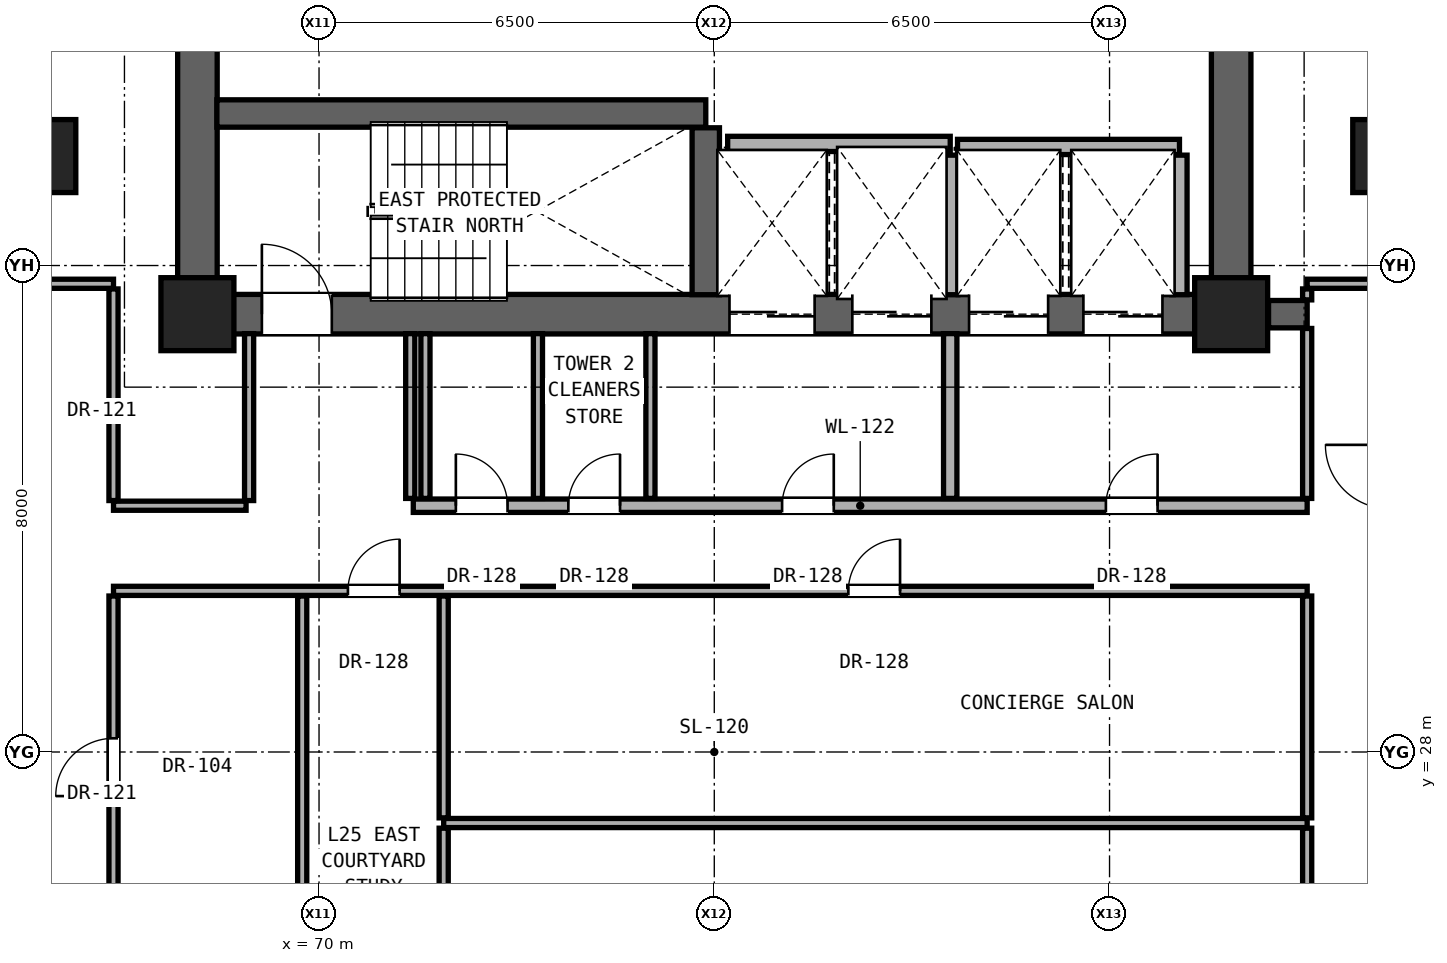
"""IFC4 building model, lengths in metres.
Left out: names, types, materials, properties, quantities, classifications, styles, units other than length and angle.
Written with IfcOpenShell. Run it as: python <this file> out.ifc"""

import sys

from ifc_helpers import new_model, si_unit, direction, frame, frame_2d, origin, origin_2d, place, context, subcontext, project, spatial, rectangle, extrude, element, fill, save


model = new_model("IFC4")
c1 = context("Model", 3, precision=1e-05, world=origin(), true_north=direction((0.0, 1.0)))
c2 = subcontext(c1, "Body", "Model", "MODEL_VIEW")
j1 = project(units=[si_unit("LENGTHUNIT", "METRE"), si_unit("PLANEANGLEUNIT", "RADIAN")], contexts=[c1])
p1 = place(None, origin())
s1 = spatial("IfcSite", under=j1, at=p1, CompositionType="ELEMENT")
p2 = place(p1, origin())
s2 = spatial("IfcBuilding", under=s1, at=p2, CompositionType="ELEMENT")
p3 = place(p2, frame((0.0, 0.0, 91.7)))
s3 = spatial("IfcBuildingStorey", under=s2, at=p3, CompositionType="ELEMENT", Elevation=91.7)
for number, where, z_axis, x_axis in (
    (1, (68.0, 35.2, 0.0), (0.0, 0.0, 1.0), (1.0, 0.0, 0.0)),
    (2, (85.0, 35.2, 0.0), (0.0, 0.0, 1.0), (1.0, 0.0, 0.0)),
):
    element("IfcColumn", number, at=place(p3, frame(where, z_axis=z_axis, x_axis=x_axis)), inside=s3, PredefinedType="COLUMN", context=c2, shape_type="SweptSolid", body=[
        extrude(rectangle(XDim=1.2, YDim=1.2, at=origin_2d()), origin(), (0.0, 0.0, 1.0), 3.3),
    ])
for number, where, z_axis, x_axis in (
    (3, (65.6, 37.8, 0.0), (0.0, 0.0, 1.0), (1.0, 0.0, 0.0)),
    (4, (87.4, 37.8, 0.0), (0.0, 0.0, 1.0), (1.0, 0.0, 0.0)),
):
    element("IfcColumn", number, at=place(p3, frame(where, z_axis=z_axis, x_axis=x_axis)), inside=s3, PredefinedType="PILASTER", context=c2, shape_type="SweptSolid", body=[
        extrude(rectangle(XDim=0.8, YDim=1.2, at=origin_2d()), origin(), (0.0, 0.0, 1.0), 3.3),
    ])
for number, where, z_axis, x_axis in (
    (5, (68.0, 35.2, 0.0), (0.0, 0.0, 1.0), (0.0, 1.0, 0.0)),
    (6, (85.0, 35.2, 0.0), (0.0, 0.0, 1.0), (0.0, 1.0, 0.0)),
):
    element("IfcWall", number, at=place(p3, frame(where, z_axis=z_axis, x_axis=x_axis)), inside=s3, PredefinedType="SHEAR", context=c2, shape_type="SweptSolid", body=[
        extrude(rectangle(XDim=5.6, YDim=0.65, at=frame_2d((2.8, 0.0))), origin(), (0.0, 0.0, 1.0), 3.08),
    ])
p4 = place(p3, frame((68.0, 35.2, 0.0), z_axis=(0.0, 0.0, 1.0), x_axis=(1.0, 0.0, 0.0)))
e7 = element("IfcWall", 7, at=p4, inside=s3, PredefinedType="SHEAR", context=c2, shape_type="SweptSolid", body=[
    extrude(rectangle(XDim=17.0, YDim=0.65, at=frame_2d((8.5, 0.0))), origin(), (0.0, 0.0, 1.0), 3.08),
])
p5 = place(p4, frame((1.06, 0.0, 0.0)))
e8 = element("IfcOpeningElement", 8, at=p5, cuts=e7, PredefinedType="OPENING", context=c2, shape_type="SweptSolid", body=[
    extrude(rectangle(XDim=1.15, YDim=2.2, at=frame_2d((0.575, 1.1))), frame((0.0, 0.335, 0.0), z_axis=(0.0, -1.0, 0.0), x_axis=(1.0, 0.0, 0.0)), (0.0, 0.0, 1.0), 0.67),
])
p6 = place(p4, frame((8.75, 0.0, 0.0)))
e9 = element("IfcOpeningElement", 9, at=p6, cuts=e7, PredefinedType="OPENING", context=c2, shape_type="SweptSolid", body=[
    extrude(rectangle(XDim=1.4, YDim=2.35, at=frame_2d((0.7, 1.175))), frame((0.0, 0.335, 0.0), z_axis=(0.0, -1.0, 0.0), x_axis=(1.0, 0.0, 0.0)), (0.0, 0.0, 1.0), 0.67),
])
p7 = place(p4, frame((10.77, 0.0, 0.0)))
e10 = element("IfcOpeningElement", 10, at=p7, cuts=e7, PredefinedType="OPENING", context=c2, shape_type="SweptSolid", body=[
    extrude(rectangle(XDim=1.3, YDim=2.3, at=frame_2d((0.65, 1.15))), frame((0.0, 0.335, 0.0), z_axis=(0.0, -1.0, 0.0), x_axis=(1.0, 0.0, 0.0)), (0.0, 0.0, 1.0), 0.67),
])
p8 = place(p4, frame((12.69, 0.0, 0.0)))
e11 = element("IfcOpeningElement", 11, at=p8, cuts=e7, PredefinedType="OPENING", context=c2, shape_type="SweptSolid", body=[
    extrude(rectangle(XDim=1.3, YDim=2.3, at=frame_2d((0.65, 1.15))), frame((0.0, 0.335, 0.0), z_axis=(0.0, -1.0, 0.0), x_axis=(1.0, 0.0, 0.0)), (0.0, 0.0, 1.0), 0.67),
])
p9 = place(p4, frame((14.57, 0.0, 0.0)))
e12 = element("IfcOpeningElement", 12, at=p9, cuts=e7, PredefinedType="OPENING", context=c2, shape_type="SweptSolid", body=[
    extrude(rectangle(XDim=1.3, YDim=2.3, at=frame_2d((0.65, 1.15))), frame((0.0, 0.335, 0.0), z_axis=(0.0, -1.0, 0.0), x_axis=(1.0, 0.0, 0.0)), (0.0, 0.0, 1.0), 0.67),
])
p10 = place(p3, frame((72.05, 26.832, 0.0), z_axis=(0.0, 0.0, 1.0), x_axis=(1.0, 0.0, 0.0)))
e13 = element("IfcWall", 13, at=p10, inside=s3, PredefinedType="PARTITIONING", context=c2, shape_type="SweptSolid", body=[
    extrude(rectangle(XDim=14.2, YDim=0.15, at=frame_2d((7.1, 0.0))), origin(), (0.0, 0.0, 1.0), 2.145),
])
p11 = place(p3, frame((66.62, 30.65, 0.0), z_axis=(0.0, 0.0, 1.0), x_axis=(1.0, 0.0, 0.0)))
e14 = element("IfcWall", 14, at=p11, inside=s3, PredefinedType="PARTITIONING", context=c2, shape_type="SweptSolid", body=[
    extrude(rectangle(XDim=19.63, YDim=0.15, at=frame_2d((9.815, 0.0))), origin(), (0.0, 0.0, 1.0), 2.145),
])
p12 = place(p11, frame((3.855, 0.0, 0.0)))
e15 = element("IfcOpeningElement", 15, at=p12, cuts=e14, PredefinedType="OPENING", context=c2, shape_type="SweptSolid", body=[
    extrude(rectangle(XDim=0.85, YDim=2.01, at=frame_2d((0.425, 1.005))), frame((0.0, 0.085, 0.0), z_axis=(0.0, -1.0, 0.0), x_axis=(1.0, 0.0, 0.0)), (0.0, 0.0, 1.0), 0.17),
])
p13 = place(p11, frame((12.085, 0.0, 0.0)))
e16 = element("IfcOpeningElement", 16, at=p13, cuts=e14, PredefinedType="OPENING", context=c2, shape_type="SweptSolid", body=[
    extrude(rectangle(XDim=0.85, YDim=2.01, at=frame_2d((0.425, 1.005))), frame((0.0, 0.085, 0.0), z_axis=(0.0, -1.0, 0.0), x_axis=(1.0, 0.0, 0.0)), (0.0, 0.0, 1.0), 0.17),
])
p14 = place(p3, frame((66.62, 32.05, 0.0), z_axis=(0.0, 0.0, 1.0), x_axis=(1.0, 0.0, 0.0)))
e17 = element("IfcWall", 17, at=p14, inside=s3, PredefinedType="PARTITIONING", context=c2, shape_type="SweptSolid", body=[
    extrude(rectangle(XDim=2.18, YDim=0.15, at=frame_2d((1.09, 0.0))), origin(), (0.0, 0.0, 1.0), 2.145),
])
p15 = place(p3, frame((71.55, 32.05, 0.0), z_axis=(0.0, 0.0, 1.0), x_axis=(1.0, 0.0, 0.0)))
e18 = element("IfcWall", 18, at=p15, inside=s3, PredefinedType="SOLIDWALL", context=c2, shape_type="SweptSolid", body=[
    extrude(rectangle(XDim=14.7, YDim=0.22, at=frame_2d((7.35, 0.0))), origin(), (0.0, 0.0, 1.0), 2.145),
])
p16 = place(p15, frame((11.39, 0.0, 0.0)))
e19 = element("IfcOpeningElement", 19, at=p16, cuts=e18, PredefinedType="OPENING", context=c2, shape_type="SweptSolid", body=[
    extrude(rectangle(XDim=0.85, YDim=2.01, at=frame_2d((0.425, 1.005))), frame((0.0, 0.12, 0.0), z_axis=(0.0, -1.0, 0.0), x_axis=(1.0, 0.0, 0.0)), (0.0, 0.0, 1.0), 0.24),
])
p17 = place(p15, frame((6.065, 0.0, 0.0)))
e20 = element("IfcOpeningElement", 20, at=p17, cuts=e18, PredefinedType="OPENING", context=c2, shape_type="SweptSolid", body=[
    extrude(rectangle(XDim=0.85, YDim=2.01, at=frame_2d((0.425, 1.005))), frame((0.0, 0.12, 0.0), z_axis=(0.0, -1.0, 0.0), x_axis=(1.0, 0.0, 0.0)), (0.0, 0.0, 1.0), 0.24),
])
p18 = place(p15, frame((0.7, 0.0, 0.0)))
e21 = element("IfcOpeningElement", 21, at=p18, cuts=e18, PredefinedType="OPENING", context=c2, shape_type="SweptSolid", body=[
    extrude(rectangle(XDim=0.85, YDim=2.01, at=frame_2d((0.425, 1.005))), frame((0.0, 0.12, 0.0), z_axis=(0.0, -1.0, 0.0), x_axis=(1.0, 0.0, 0.0)), (0.0, 0.0, 1.0), 0.24),
])
p19 = place(p15, frame((2.55, 0.0, 0.0)))
e22 = element("IfcOpeningElement", 22, at=p19, cuts=e18, PredefinedType="OPENING", context=c2, shape_type="SweptSolid", body=[
    extrude(rectangle(XDim=0.85, YDim=2.01, at=frame_2d((0.425, 1.005))), frame((0.0, 0.12, 0.0), z_axis=(0.0, -1.0, 0.0), x_axis=(1.0, 0.0, 0.0)), (0.0, 0.0, 1.0), 0.24),
])
p20 = place(p3, frame((85.615, 35.2, 0.0), z_axis=(0.0, 0.0, 1.0), x_axis=(1.0, 0.0, 0.0)))
e23 = element("IfcWall", 23, at=p20, inside=s3, PredefinedType="SHEAR", context=c2, shape_type="SweptSolid", body=[
    extrude(rectangle(XDim=0.635, YDim=0.45, at=frame_2d((0.317, 0.0))), origin(), (0.0, 0.0, 1.0), 3.08),
])
p21 = place(p3, frame((65.25, 35.7, 0.0), z_axis=(0.0, 0.0, 1.0), x_axis=(1.0, 0.0, 0.0)))
e24 = element("IfcWall", 24, at=p21, inside=s3, PredefinedType="PARTITIONING", context=c2, shape_type="SweptSolid", body=[
    extrude(rectangle(XDim=1.37, YDim=0.15, at=frame_2d((0.685, 0.0))), origin(), (0.0, 0.0, 1.0), 3.08),
])
p22 = place(p3, frame((86.25, 35.7, 0.0), z_axis=(0.0, 0.0, 1.0), x_axis=(1.0, 0.0, 0.0)))
e25 = element("IfcWall", 25, at=p22, inside=s3, PredefinedType="PARTITIONING", context=c2, shape_type="SweptSolid", body=[
    extrude(rectangle(XDim=1.35, YDim=0.15, at=frame_2d((0.675, 0.0))), origin(), (0.0, 0.0, 1.0), 3.08),
])
p23 = place(p3, frame((80.5, 37.95, 0.0), z_axis=(0.0, 0.0, 1.0), x_axis=(1.0, 0.0, 0.0)))
e26 = element("IfcWall", 26, at=p23, inside=s3, PredefinedType="SOLIDWALL", context=c2, shape_type="SweptSolid", body=[
    extrude(rectangle(XDim=3.65, YDim=0.25, at=frame_2d((1.825, 0.0))), origin(), (0.0, 0.0, 1.0), 3.08),
])
p24 = place(p3, frame((76.72, 38.0, 0.0), z_axis=(0.0, 0.0, 1.0), x_axis=(1.0, 0.0, 0.0)))
e27 = element("IfcWall", 27, at=p24, inside=s3, PredefinedType="SOLIDWALL", context=c2, shape_type="SweptSolid", body=[
    extrude(rectangle(XDim=3.66, YDim=0.25, at=frame_2d((1.83, 0.0))), origin(), (0.0, 0.0, 1.0), 3.08),
])
p25 = place(p3, frame((68.32, 38.5, 0.0), z_axis=(0.0, 0.0, 1.0), x_axis=(1.0, 0.0, 0.0)))
e28 = element("IfcWall", 28, at=p25, inside=s3, PredefinedType="SHEAR", context=c2, shape_type="SweptSolid", body=[
    extrude(rectangle(XDim=8.04, YDim=0.45, at=frame_2d((4.02, 0.0))), origin(), (0.0, 0.0, 1.0), 3.08),
])
p26 = place(p3, frame((66.62, 24.935, 0.0), z_axis=(0.0, 0.0, 1.0), x_axis=(0.0, 1.0, 0.0)))
e29 = element("IfcWall", 29, at=p26, inside=s3, PredefinedType="PARTITIONING", context=c2, shape_type="SweptSolid", body=[
    extrude(rectangle(XDim=5.63, YDim=0.15, at=frame_2d((2.815, 0.0))), origin(), (0.0, 0.0, 1.0), 2.299),
])
p27 = place(p26, frame((2.34, 0.0, 0.0)))
e30 = element("IfcOpeningElement", 30, at=p27, cuts=e29, PredefinedType="OPENING", context=c2, shape_type="SweptSolid", body=[
    extrude(rectangle(XDim=0.95, YDim=2.15, at=frame_2d((0.475, 1.075))), frame((0.0, 0.085, 0.0), z_axis=(0.0, -1.0, 0.0), x_axis=(1.0, 0.0, 0.0)), (0.0, 0.0, 1.0), 0.17),
])
p28 = place(p3, frame((66.62, 32.135, 0.0), z_axis=(0.0, 0.0, 1.0), x_axis=(0.0, 1.0, 0.0)))
e31 = element("IfcWall", 31, at=p28, inside=s3, PredefinedType="PARTITIONING", context=c2, shape_type="SweptSolid", body=[
    extrude(rectangle(XDim=3.48, YDim=0.15, at=frame_2d((1.74, 0.0))), origin(), (0.0, 0.0, 1.0), 2.472),
])
p29 = place(p3, frame((68.85, 32.135, 0.0), z_axis=(0.0, 0.0, 1.0), x_axis=(0.0, 1.0, 0.0)))
e32 = element("IfcWall", 32, at=p29, inside=s3, PredefinedType="PARTITIONING", context=c2, shape_type="SweptSolid", body=[
    extrude(rectangle(XDim=2.745, YDim=0.15, at=frame_2d((1.373, 0.0))), origin(), (0.0, 0.0, 1.0), 3.08),
])
p30 = place(p3, frame((69.723, 24.935, 0.0), z_axis=(0.0, 0.0, 1.0), x_axis=(0.0, 1.0, 0.0)))
e33 = element("IfcWall", 33, at=p30, inside=s3, PredefinedType="PARTITIONING", context=c2, shape_type="SweptSolid", body=[
    extrude(rectangle(XDim=5.63, YDim=0.15, at=frame_2d((2.815, 0.0))), origin(), (0.0, 0.0, 1.0), 2.145),
])
for number, where, z_axis, x_axis in (
    (34, (71.5, 32.17, 0.0), (0.0, 0.0, 1.0), (0.0, 1.0, 0.0)),
    (35, (71.75, 32.17, 0.0), (0.0, 0.0, 1.0), (0.0, 1.0, 0.0)),
):
    element("IfcWall", number, at=place(p3, frame(where, z_axis=z_axis, x_axis=x_axis)), inside=s3, PredefinedType="PARTITIONING", context=c2, shape_type="SweptSolid", body=[
        extrude(rectangle(XDim=2.71, YDim=0.15, at=frame_2d((1.355, 0.0))), origin(), (0.0, 0.0, 1.0), 3.08),
    ])
p31 = place(p3, frame((72.05, 22.435, 0.0), z_axis=(0.0, 0.0, 1.0), x_axis=(0.0, 1.0, 0.0)))
e36 = element("IfcWall", 36, at=p31, inside=s3, PredefinedType="PARTITIONING", context=c2, shape_type="SweptSolid", body=[
    extrude(rectangle(XDim=4.312, YDim=0.15, at=frame_2d((2.156, 0.0))), origin(), (0.0, 0.0, 1.0), 2.609),
])
p32 = place(p3, frame((72.05, 26.917, 0.0), z_axis=(0.0, 0.0, 1.0), x_axis=(0.0, 1.0, 0.0)))
e37 = element("IfcWall", 37, at=p32, inside=s3, PredefinedType="PARTITIONING", context=c2, shape_type="SweptSolid", body=[
    extrude(rectangle(XDim=3.648, YDim=0.15, at=frame_2d((1.824, 0.0))), origin(), (0.0, 0.0, 1.0), 2.145),
])
for number, where, z_axis, x_axis in (
    (38, (73.6, 32.17, 0.0), (0.0, 0.0, 1.0), (0.0, 1.0, 0.0)),
    (39, (75.45, 32.17, 0.0), (0.0, 0.0, 1.0), (0.0, 1.0, 0.0)),
):
    element("IfcWall", number, at=place(p3, frame(where, z_axis=z_axis, x_axis=x_axis)), inside=s3, PredefinedType="PARTITIONING", context=c2, shape_type="SweptSolid", body=[
        extrude(rectangle(XDim=2.71, YDim=0.15, at=frame_2d((1.355, 0.0))), origin(), (0.0, 0.0, 1.0), 3.08),
    ])
p33 = place(p3, frame((76.36, 35.52, 0.0), z_axis=(0.0, 0.0, 1.0), x_axis=(0.0, 1.0, 0.0)))
e40 = element("IfcWall", 40, at=p33, inside=s3, PredefinedType="SHEAR", context=c2, shape_type="SweptSolid", body=[
    extrude(rectangle(XDim=2.745, YDim=0.45, at=frame_2d((1.373, 0.0))), origin(), (0.0, 0.0, 1.0), 3.08),
])
p34 = place(p3, frame((80.38, 32.17, 0.0), z_axis=(0.0, 0.0, 1.0), x_axis=(0.0, 1.0, 0.0)))
e41 = element("IfcWall", 41, at=p34, inside=s3, PredefinedType="SOLIDWALL", context=c2, shape_type="SweptSolid", body=[
    extrude(rectangle(XDim=2.71, YDim=0.22, at=frame_2d((1.355, 0.0))), origin(), (0.0, 0.0, 1.0), 3.08),
])
for number, where, z_axis, x_axis in (
    (42, (80.38, 35.52, 0.0), (0.0, 0.0, 1.0), (0.0, 1.0, 0.0)),
    (43, (84.15, 35.52, 0.0), (0.0, 0.0, 1.0), (0.0, 1.0, 0.0)),
):
    element("IfcWall", number, at=place(p3, frame(where, z_axis=z_axis, x_axis=x_axis)), inside=s3, PredefinedType="SOLIDWALL", context=c2, shape_type="SweptSolid", body=[
        extrude(rectangle(XDim=2.295, YDim=0.25, at=frame_2d((1.147, 0.0))), origin(), (0.0, 0.0, 1.0), 3.08),
    ])
p35 = place(p3, frame((86.25, 22.435, 0.0), z_axis=(0.0, 0.0, 1.0), x_axis=(0.0, 1.0, 0.0)))
e44 = element("IfcWall", 44, at=p35, inside=s3, PredefinedType="PARTITIONING", context=c2, shape_type="SweptSolid", body=[
    extrude(rectangle(XDim=4.312, YDim=0.15, at=frame_2d((2.156, 0.0))), origin(), (0.0, 0.0, 1.0), 3.08),
])
p36 = place(p3, frame((86.25, 26.917, 0.0), z_axis=(0.0, 0.0, 1.0), x_axis=(0.0, 1.0, 0.0)))
e45 = element("IfcWall", 45, at=p36, inside=s3, PredefinedType="PARTITIONING", context=c2, shape_type="SweptSolid", body=[
    extrude(rectangle(XDim=3.648, YDim=0.15, at=frame_2d((1.824, 0.0))), origin(), (0.0, 0.0, 1.0), 2.299),
])
p37 = place(p3, frame((86.25, 32.17, 0.0), z_axis=(0.0, 0.0, 1.0), x_axis=(0.0, 1.0, 0.0)))
e46 = element("IfcWall", 46, at=p37, inside=s3, PredefinedType="PARTITIONING", context=c2, shape_type="SweptSolid", body=[
    extrude(rectangle(XDim=2.795, YDim=0.15, at=frame_2d((1.397, 0.0))), origin(), (0.0, 0.0, 1.0), 2.472),
])
p38 = place(p3, frame((86.25, 35.435, 0.0), z_axis=(0.0, 0.0, 1.0), x_axis=(0.0, 1.0, 0.0)))
e47 = element("IfcWall", 47, at=p38, inside=s3, PredefinedType="PARTITIONING", context=c2, shape_type="SweptSolid", body=[
    extrude(rectangle(XDim=0.18, YDim=0.15, at=frame_2d((0.09, 0.0))), origin(), (0.0, 0.0, 1.0), 2.472),
])
p39 = place(p16, origin())
e48 = element("IfcDoor", 48, at=p39, inside=s3, OperationType="SINGLE_SWING_RIGHT", PredefinedType="DOOR", context=c2, shape_type="SweptSolid", body=[
    extrude(rectangle(XDim=0.85, YDim=2.01, at=frame_2d((0.425, 1.005))), frame((0.0, 0.025, 0.0), z_axis=(0.0, -1.0, 0.0), x_axis=(1.0, 0.0, 0.0)), (0.0, 0.0, 1.0), 0.05),
])
fill(e19, e48)
p40 = place(p5, origin())
e49 = element("IfcDoor", 49, at=p40, inside=s3, OperationType="SINGLE_SWING_LEFT", PredefinedType="DOOR", context=c2, shape_type="SweptSolid", body=[
    extrude(rectangle(XDim=1.15, YDim=2.2, at=frame_2d((0.575, 1.1))), frame((0.0, 0.025, 0.0), z_axis=(0.0, -1.0, 0.0), x_axis=(1.0, 0.0, 0.0)), (0.0, 0.0, 1.0), 0.05),
])
fill(e8, e49)
p41 = place(p17, origin())
e50 = element("IfcDoor", 50, at=p41, inside=s3, OperationType="SINGLE_SWING_RIGHT", PredefinedType="DOOR", context=c2, shape_type="SweptSolid", body=[
    extrude(rectangle(XDim=0.85, YDim=2.01, at=frame_2d((0.425, 1.005))), frame((0.0, 0.025, 0.0), z_axis=(0.0, -1.0, 0.0), x_axis=(1.0, 0.0, 0.0)), (0.0, 0.0, 1.0), 0.05),
])
fill(e20, e50)
p42 = place(p18, origin())
e51 = element("IfcDoor", 51, at=p42, inside=s3, OperationType="SINGLE_SWING_LEFT", PredefinedType="DOOR", context=c2, shape_type="SweptSolid", body=[
    extrude(rectangle(XDim=0.85, YDim=2.01, at=frame_2d((0.425, 1.005))), frame((0.0, 0.025, 0.0), z_axis=(0.0, -1.0, 0.0), x_axis=(1.0, 0.0, 0.0)), (0.0, 0.0, 1.0), 0.05),
])
fill(e21, e51)
p43 = place(p19, origin())
e52 = element("IfcDoor", 52, at=p43, inside=s3, OperationType="SINGLE_SWING_RIGHT", PredefinedType="DOOR", context=c2, shape_type="SweptSolid", body=[
    extrude(rectangle(XDim=0.85, YDim=2.01, at=frame_2d((0.425, 1.005))), frame((0.0, 0.025, 0.0), z_axis=(0.0, -1.0, 0.0), x_axis=(1.0, 0.0, 0.0)), (0.0, 0.0, 1.0), 0.05),
])
fill(e22, e52)
p44 = place(p27, origin())
e53 = element("IfcDoor", 53, at=p44, inside=s3, OperationType="SINGLE_SWING_LEFT", PredefinedType="DOOR", context=c2, shape_type="SweptSolid", body=[
    extrude(rectangle(XDim=0.95, YDim=2.15, at=frame_2d((0.475, 1.075))), frame((0.0, 0.025, 0.0), z_axis=(0.0, -1.0, 0.0), x_axis=(1.0, 0.0, 0.0)), (0.0, 0.0, 1.0), 0.05),
])
fill(e30, e53)
p45 = place(p12, origin())
e54 = element("IfcDoor", 54, at=p45, inside=s3, OperationType="SINGLE_SWING_RIGHT", PredefinedType="DOOR", context=c2, shape_type="SweptSolid", body=[
    extrude(rectangle(XDim=0.85, YDim=2.01, at=frame_2d((0.425, 1.005))), frame((0.0, 0.025, 0.0), z_axis=(0.0, -1.0, 0.0), x_axis=(1.0, 0.0, 0.0)), (0.0, 0.0, 1.0), 0.05),
])
fill(e15, e54)
p46 = place(p13, origin())
e55 = element("IfcDoor", 55, at=p46, inside=s3, OperationType="SINGLE_SWING_RIGHT", PredefinedType="DOOR", context=c2, shape_type="SweptSolid", body=[
    extrude(rectangle(XDim=0.85, YDim=2.01, at=frame_2d((0.425, 1.005))), frame((0.0, 0.025, 0.0), z_axis=(0.0, -1.0, 0.0), x_axis=(1.0, 0.0, 0.0)), (0.0, 0.0, 1.0), 0.05),
])
fill(e16, e55)
p47 = place(p6, origin())
e56 = element("IfcDoor", 56, at=p47, inside=s3, OperationType="DOUBLE_DOOR_SLIDING", PredefinedType="DOOR", context=c2, shape_type="SweptSolid", body=[
    extrude(rectangle(XDim=1.4, YDim=2.35, at=frame_2d((0.7, 1.175))), frame((0.0, 0.025, 0.0), z_axis=(0.0, -1.0, 0.0), x_axis=(1.0, 0.0, 0.0)), (0.0, 0.0, 1.0), 0.05),
])
fill(e9, e56)
p48 = place(p7, origin())
e57 = element("IfcDoor", 57, at=p48, inside=s3, OperationType="DOUBLE_DOOR_SLIDING", PredefinedType="DOOR", context=c2, shape_type="SweptSolid", body=[
    extrude(rectangle(XDim=1.3, YDim=2.3, at=frame_2d((0.65, 1.15))), frame((0.0, 0.025, 0.0), z_axis=(0.0, -1.0, 0.0), x_axis=(1.0, 0.0, 0.0)), (0.0, 0.0, 1.0), 0.05),
])
fill(e10, e57)
p49 = place(p8, origin())
e58 = element("IfcDoor", 58, at=p49, inside=s3, OperationType="DOUBLE_DOOR_SLIDING", PredefinedType="DOOR", context=c2, shape_type="SweptSolid", body=[
    extrude(rectangle(XDim=1.3, YDim=2.3, at=frame_2d((0.65, 1.15))), frame((0.0, 0.025, 0.0), z_axis=(0.0, -1.0, 0.0), x_axis=(1.0, 0.0, 0.0)), (0.0, 0.0, 1.0), 0.05),
])
fill(e11, e58)
p50 = place(p9, origin())
e59 = element("IfcDoor", 59, at=p50, inside=s3, OperationType="DOUBLE_DOOR_SLIDING", PredefinedType="DOOR", context=c2, shape_type="SweptSolid", body=[
    extrude(rectangle(XDim=1.3, YDim=2.3, at=frame_2d((0.65, 1.15))), frame((0.0, 0.025, 0.0), z_axis=(0.0, -1.0, 0.0), x_axis=(1.0, 0.0, 0.0)), (0.0, 0.0, 1.0), 0.05),
])
fill(e12, e59)
save(model, sys.argv[1])
